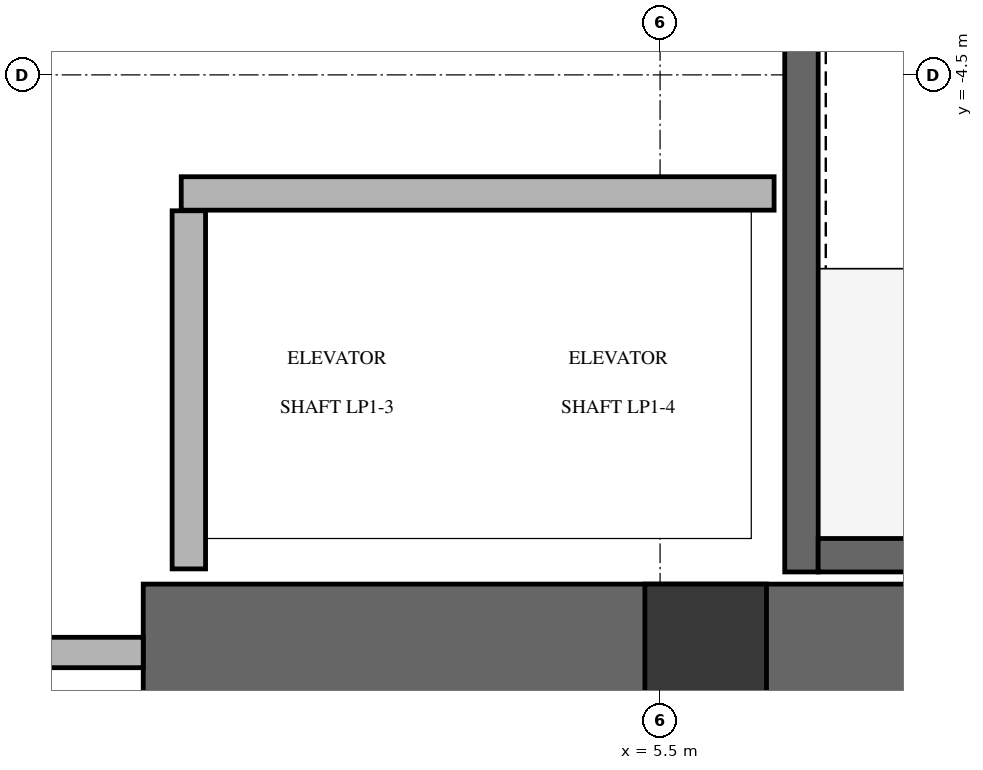
"""IFC4 building model, lengths in metres.
Left out: names, types, materials, properties, quantities, classifications, styles, units other than length and angle.
Written with IfcOpenShell. Run it as: python <this file> out.ifc"""

import sys

from ifc_helpers import new_model, si_unit, direction, frame, frame_2d, origin, origin_2d, place, context, subcontext, project, spatial, rectangle, extrude, source, transform, mapped, element, save


model = new_model("IFC4")
c1 = context("Model", 3, precision=1e-05, world=origin(), true_north=direction((0.0, 1.0)))
c2 = subcontext(c1, "Body", "Model", "MODEL_VIEW")
j1 = project(units=[si_unit("LENGTHUNIT", "METRE"), si_unit("PLANEANGLEUNIT", "RADIAN")], contexts=[c1])
p1 = place(None, origin())
s1 = spatial("IfcSite", under=j1, at=p1, CompositionType="ELEMENT")
p2 = place(p1, origin())
s2 = spatial("IfcBuilding", under=s1, at=p2, CompositionType="ELEMENT")
p3 = place(p2, frame((0.0, 0.0, 15.6)))
s3 = spatial("IfcBuildingStorey", under=s2, at=p3, CompositionType="ELEMENT", Elevation=15.6)
p4 = place(p3, frame((2.1, -8.3, 0.0), z_axis=(0.0, 0.0, 1.0), x_axis=(1.0, 0.0, 0.0)))
e1 = element("IfcWall", 1, at=p4, inside=s3, PredefinedType="SHEAR", context=c2, shape_type="SweptSolid", body=[
    extrude(rectangle(XDim=7.75, YDim=0.9, at=frame_2d((3.875, 0.0))), origin(), (0.0, 0.0, 1.0), 5.6),
])
p5 = place(p3, frame((6.43, 0.12, -0.32), z_axis=(0.0, 0.0, 1.0), x_axis=(0.0, -1.0, 0.0)))
e2 = element("IfcWall", 2, at=p5, inside=s3, PredefinedType="SHEAR", context=c2, shape_type="SweptSolid", body=[
    extrude(rectangle(XDim=7.89, YDim=0.22, at=frame_2d((3.945, 0.0))), origin(), (0.0, 0.0, 1.0), 5.6),
])
p6 = place(p5, frame((0.52, 0.0, 0.0)))
e3 = element("IfcOpeningElement", 3, at=p6, cuts=e2, PredefinedType="OPENING", context=c2, shape_type="SweptSolid", body=[
    extrude(rectangle(XDim=1.05, YDim=2.15, at=frame_2d((0.525, 1.075))), frame((0.0, 0.12, 0.0), z_axis=(0.0, -1.0, 0.0), x_axis=(1.0, 0.0, 0.0)), (0.0, 0.0, 1.0), 0.24),
])
p7 = place(p3, frame((6.54, -7.66, -0.32), z_axis=(0.0, 0.0, 1.0), x_axis=(1.0, 0.0, 0.0)))
e4 = element("IfcWall", 4, at=p7, inside=s3, PredefinedType="SHEAR", context=c2, shape_type="SweptSolid", body=[
    extrude(rectangle(XDim=2.96, YDim=0.22, at=frame_2d((1.48, 0.0))), origin(), (0.0, 0.0, 1.0), 5.6),
])
m1 = source(origin(), c2, "Body", "SweptSolid", [
    extrude(rectangle(XDim=0.8, YDim=0.8, at=origin_2d()), origin(), (0.0, 0.0, 1.0), 5.6),
])
p8 = place(p3, frame((5.8, -8.25, -0.32), z_axis=(0.0, 0.0, 1.0), x_axis=(1.0, 0.0, 0.0)))
e5 = element("IfcColumn", 5, at=p8, inside=s3, PredefinedType="PILASTER", context=c2, shape_type="MappedRepresentation", body=[
    mapped(m1, transform((0.0, 0.0, 0.0), x_axis=(1.0, 0.0, 0.0), y_axis=(0.0, 1.0, 0.0), z_axis=(0.0, 0.0, 1.0), scale=1.0)),
])
p9 = place(p3, frame((-2.1, -8.3, 0.0), z_axis=(0.0, 0.0, 1.0), x_axis=(1.0, 0.0, 0.0)))
e6 = element("IfcWall", 6, at=p9, inside=s3, PredefinedType="SOLIDWALL", context=c2, shape_type="SweptSolid", body=[
    extrude(rectangle(XDim=4.2, YDim=0.2, at=frame_2d((2.1, 0.0))), origin(), (0.0, 0.0, 1.0), 5.265),
])
p10 = place(p9, frame((1.2, 0.0, 0.0)))
e7 = element("IfcOpeningElement", 7, at=p10, cuts=e6, PredefinedType="OPENING", context=c2, shape_type="SweptSolid", body=[
    extrude(rectangle(XDim=1.8, YDim=2.15, at=frame_2d((0.9, 1.075))), frame((0.0, 0.11, 0.0), z_axis=(0.0, -1.0, 0.0), x_axis=(1.0, 0.0, 0.0)), (0.0, 0.0, 1.0), 0.22),
])
p11 = place(p3, frame((2.35, -5.28, 0.0), z_axis=(0.0, 0.0, 1.0), x_axis=(1.0, 0.0, 0.0)))
e8 = element("IfcWall", 8, at=p11, inside=s3, PredefinedType="SOLIDWALL", context=c2, shape_type="SweptSolid", body=[
    extrude(rectangle(XDim=3.9, YDim=0.22, at=frame_2d((1.95, 0.0))), origin(), (0.0, 0.0, 1.0), 5.265),
])
p12 = place(p3, frame((2.4, -7.75, 0.0), z_axis=(0.0, 0.0, 1.0), x_axis=(0.0, 1.0, 0.0)))
e9 = element("IfcWall", 9, at=p12, inside=s3, PredefinedType="SOLIDWALL", context=c2, shape_type="SweptSolid", body=[
    extrude(rectangle(XDim=2.356, YDim=0.22, at=frame_2d((1.178, 0.0))), origin(), (0.0, 0.0, 1.0), 5.265),
])
save(model, sys.argv[1])
